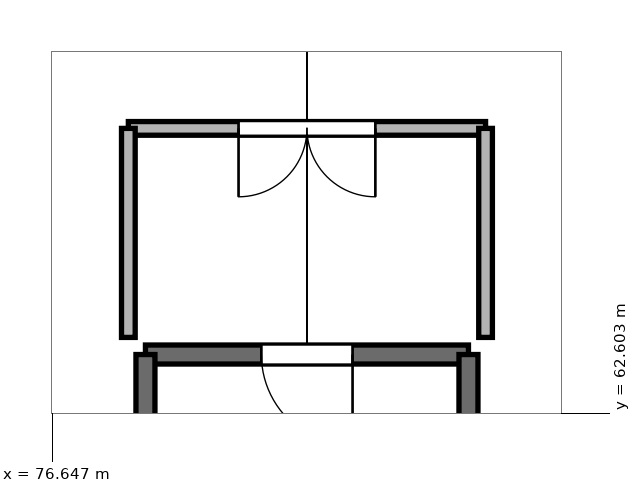
"""IFC4 building model, lengths in metres.
Left out: names, types, materials, properties, quantities, classifications, styles, units other than length and angle.
Written with IfcOpenShell. Run it as: python <this file> out.ifc"""

import sys

from ifc_helpers import new_model, si_unit, direction, frame, frame_2d, origin, place, context, subcontext, project, spatial, rectangle, extrude, element, fill, save


model = new_model("IFC4")
c1 = context("Model", 3, precision=1e-05, world=origin(), true_north=direction((0.0, 1.0)))
c2 = subcontext(c1, "Body", "Model", "MODEL_VIEW")
j1 = project(units=[si_unit("LENGTHUNIT", "METRE"), si_unit("PLANEANGLEUNIT", "RADIAN")], contexts=[c1])
p1 = place(None, origin())
s1 = spatial("IfcSite", under=j1, at=p1, CompositionType="ELEMENT")
p2 = place(p1, origin())
s2 = spatial("IfcBuilding", under=s1, at=p2, CompositionType="ELEMENT")
p3 = place(p2, frame((0.0, 0.0, 27.55)))
s3 = spatial("IfcBuildingStorey", under=s2, at=p3, CompositionType="ELEMENT", Elevation=27.55)
p4 = place(p3, frame((82.125, 63.375, 0.0), z_axis=(0.0, 0.0, 1.0), x_axis=(-1.0, 0.0, 0.0)))
e1 = element("IfcWall", 1, at=p4, inside=s3, PredefinedType="SHEAR", context=c2, shape_type="SweptSolid", body=[
    extrude(rectangle(XDim=4.25, YDim=0.25, at=frame_2d((2.125, 0.0))), origin(), (0.0, 0.0, 1.0), 2.99),
])
p5 = place(p4, frame((1.525, 0.0, 0.0)))
e2 = element("IfcOpeningElement", 2, at=p5, cuts=e1, PredefinedType="OPENING", context=c2, shape_type="SweptSolid", body=[
    extrude(rectangle(XDim=1.2, YDim=2.2, at=frame_2d((0.6, 1.1))), frame((0.0, 0.137, 0.0), z_axis=(0.0, -1.0, 0.0), x_axis=(1.0, 0.0, 0.0)), (0.0, 0.0, 1.0), 0.274),
])
for number, where, z_axis, x_axis in (
    (3, (77.875, 63.375, 0.0), (0.0, 0.0, 1.0), (0.0, -1.0, 0.0)),
    (4, (82.125, 56.175, 0.0), (0.0, 0.0, 1.0), (0.0, 1.0, 0.0)),
):
    element("IfcWall", number, at=place(p3, frame(where, z_axis=z_axis, x_axis=x_axis)), inside=s3, PredefinedType="SHEAR", context=c2, shape_type="SweptSolid", body=[
        extrude(rectangle(XDim=7.2, YDim=0.25, at=frame_2d((3.6, 0.0))), origin(), (0.0, 0.0, 1.0), 2.99),
    ])
p6 = place(p3, frame((77.65, 66.35, 0.0), z_axis=(0.0, 0.0, 1.0), x_axis=(1.0, 0.0, 0.0)))
e5 = element("IfcWall", 5, at=p6, inside=s3, PredefinedType="PARTITIONING", context=c2, shape_type="SweptSolid", body=[
    extrude(rectangle(XDim=4.7, YDim=0.18, at=frame_2d((2.35, 0.0))), origin(), (0.0, 0.0, 1.0), 2.53),
])
p7 = place(p6, frame((1.45, 0.0, 0.0)))
e6 = element("IfcOpeningElement", 6, at=p7, cuts=e5, PredefinedType="OPENING", context=c2, shape_type="SweptSolid", body=[
    extrude(rectangle(XDim=1.8, YDim=2.2, at=frame_2d((0.9, 1.1))), frame((0.0, 0.102, 0.0), z_axis=(0.0, -1.0, 0.0), x_axis=(1.0, 0.0, 0.0)), (0.0, 0.0, 1.0), 0.204),
])
for number, where, z_axis, x_axis in (
    (7, (77.65, 63.6, 0.0), (0.0, 0.0, 1.0), (0.0, 1.0, 0.0)),
    (8, (82.35, 63.6, 0.0), (0.0, 0.0, 1.0), (0.0, 1.0, 0.0)),
):
    element("IfcWall", number, at=place(p3, frame(where, z_axis=z_axis, x_axis=x_axis)), inside=s3, PredefinedType="PARTITIONING", context=c2, shape_type="SweptSolid", body=[
        extrude(rectangle(XDim=2.75, YDim=0.18, at=frame_2d((1.375, 0.0))), origin(), (0.0, 0.0, 1.0), 2.53),
    ])
p8 = place(p5, origin())
e9 = element("IfcDoor", 9, at=p8, inside=s3, OperationType="SINGLE_SWING_LEFT", PredefinedType="DOOR", context=c2, shape_type="SweptSolid", body=[
    extrude(rectangle(XDim=1.2, YDim=2.2, at=frame_2d((0.6, 1.1))), frame((0.0, 0.025, 0.0), z_axis=(0.0, -1.0, 0.0), x_axis=(1.0, 0.0, 0.0)), (0.0, 0.0, 1.0), 0.05),
])
fill(e2, e9)
p9 = place(p7, frame((1.8, 0.0, 0.0), z_axis=(0.0, 0.0, 1.0), x_axis=(-1.0, 0.0, 0.0)))
e10 = element("IfcDoor", 10, at=p9, inside=s3, OperationType="DOUBLE_DOOR_SINGLE_SWING", PredefinedType="DOOR", context=c2, shape_type="SweptSolid", body=[
    extrude(rectangle(XDim=1.8, YDim=2.2, at=frame_2d((0.9, 1.1))), frame((0.0, 0.025, 0.0), z_axis=(0.0, -1.0, 0.0), x_axis=(1.0, 0.0, 0.0)), (0.0, 0.0, 1.0), 0.05),
])
fill(e6, e10)
save(model, sys.argv[1])
